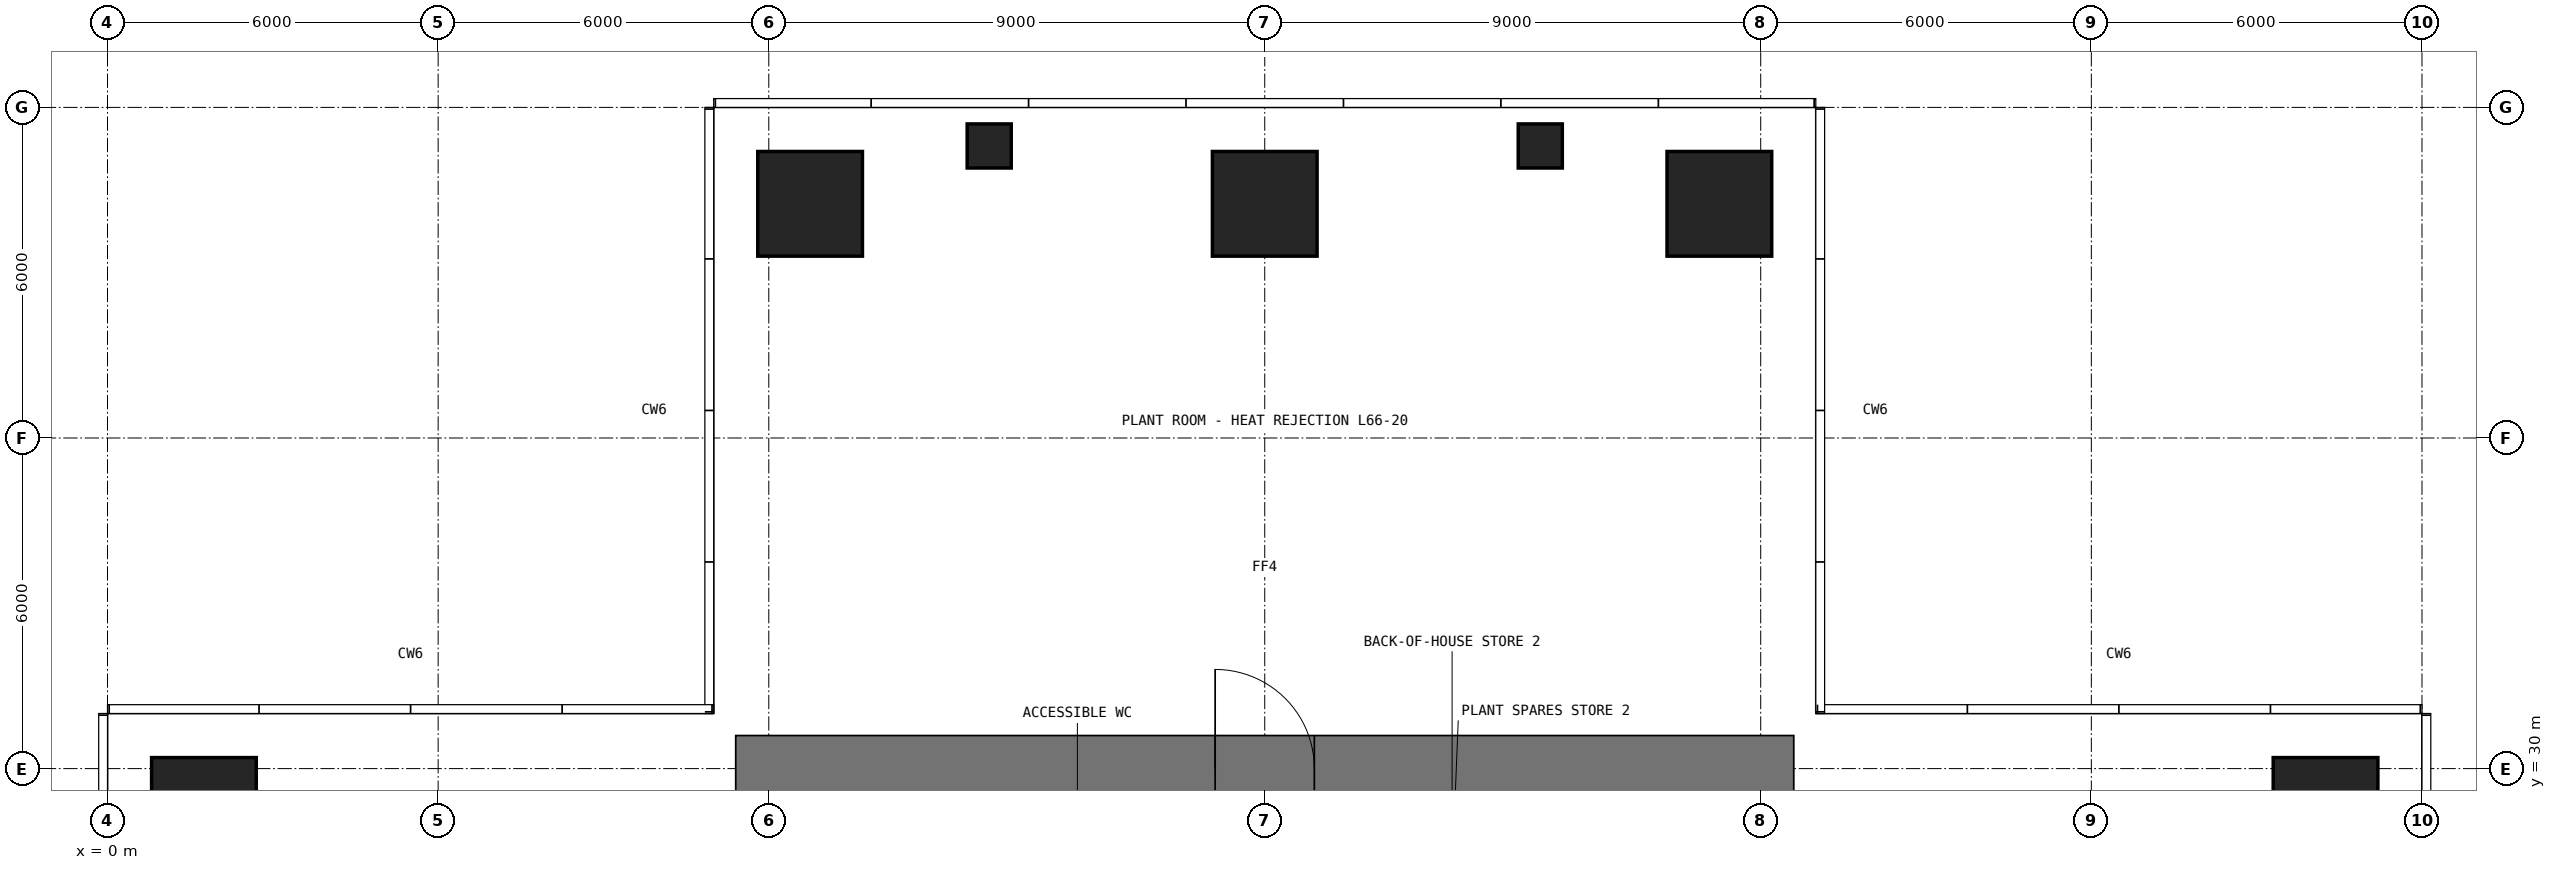
"""IFC4 building model, lengths in metres.
Left out: names, types, materials, properties, quantities, classifications, styles, units other than length and angle.
Written with IfcOpenShell. Run it as: python <this file> out.ifc"""

import sys

from ifc_helpers import new_model, si_unit, direction, frame, frame_2d, origin, origin_2d, place, context, subcontext, project, spatial, rectangle, extrude, element, fill, save


model = new_model("IFC4")
c1 = context("Model", 3, precision=1e-05, world=origin(), true_north=direction((0.0, 1.0)))
c2 = subcontext(c1, "Body", "Model", "MODEL_VIEW")
j1 = project(units=[si_unit("LENGTHUNIT", "METRE"), si_unit("PLANEANGLEUNIT", "RADIAN")], contexts=[c1])
p1 = place(None, origin())
s1 = spatial("IfcSite", under=j1, at=p1, CompositionType="ELEMENT")
p2 = place(p1, origin())
s2 = spatial("IfcBuilding", under=s1, at=p2, CompositionType="ELEMENT")
p3 = place(p2, frame((0.0, 0.0, 277.9)))
s3 = spatial("IfcBuildingStorey", under=s2, at=p3, CompositionType="ELEMENT", Elevation=277.9)
for number, where, z_axis, x_axis in (
    (1, (1.75, 29.25, 0.0), (0.0, 0.0, 1.0), (1.0, 0.0, 0.0)),
    (2, (40.25, 29.25, 0.0), (0.0, 0.0, 1.0), (1.0, 0.0, 0.0)),
    (3, (12.75, 40.25, 0.0), (0.0, 0.0, 1.0), (1.0, 0.0, 0.0)),
):
    element("IfcColumn", number, at=place(p3, frame(where, z_axis=z_axis, x_axis=x_axis)), inside=s3, PredefinedType="COLUMN", context=c2, shape_type="SweptSolid", body=[
        extrude(rectangle(XDim=1.9, YDim=1.9, at=origin_2d()), origin(), (0.0, 0.0, 1.0), 6.0),
    ])
p4 = place(p3, frame((16.0, 41.3, 0.0), z_axis=(0.0, 0.0, 1.0), x_axis=(1.0, 0.0, 0.0)))
e4 = element("IfcColumn", 4, at=p4, inside=s3, PredefinedType="COLUMN", context=c2, shape_type="SweptSolid", body=[
    extrude(rectangle(XDim=0.8, YDim=0.8, at=origin_2d()), origin(), (0.0, 0.0, 1.0), 6.0),
])
p5 = place(p3, frame((21.0, 40.25, 0.0), z_axis=(0.0, 0.0, 1.0), x_axis=(1.0, 0.0, 0.0)))
e5 = element("IfcColumn", 5, at=p5, inside=s3, PredefinedType="COLUMN", context=c2, shape_type="SweptSolid", body=[
    extrude(rectangle(XDim=1.9, YDim=1.9, at=origin_2d()), origin(), (0.0, 0.0, 1.0), 6.0),
])
p6 = place(p3, frame((26.0, 41.3, 0.0), z_axis=(0.0, 0.0, 1.0), x_axis=(1.0, 0.0, 0.0)))
e6 = element("IfcColumn", 6, at=p6, inside=s3, PredefinedType="COLUMN", context=c2, shape_type="SweptSolid", body=[
    extrude(rectangle(XDim=0.8, YDim=0.8, at=origin_2d()), origin(), (0.0, 0.0, 1.0), 6.0),
])
p7 = place(p3, frame((29.25, 40.25, 0.0), z_axis=(0.0, 0.0, 1.0), x_axis=(1.0, 0.0, 0.0)))
e7 = element("IfcColumn", 7, at=p7, inside=s3, PredefinedType="COLUMN", context=c2, shape_type="SweptSolid", body=[
    extrude(rectangle(XDim=1.9, YDim=1.9, at=origin_2d()), origin(), (0.0, 0.0, 1.0), 6.0),
])
p8 = place(p3, frame((11.4, 30.0, -0.1), z_axis=(0.0, 0.0, 1.0), x_axis=(1.0, 0.0, 0.0)))
e8 = element("IfcWall", 8, at=p8, inside=s3, PredefinedType="SHEAR", context=c2, shape_type="SweptSolid", body=[
    extrude(rectangle(XDim=19.2, YDim=1.2, at=frame_2d((9.6, 0.0))), origin(), (0.0, 0.0, 1.0), 6.0),
])
p9 = place(p8, frame((8.7, 0.0, 0.1)))
e9 = element("IfcOpeningElement", 9, at=p9, cuts=e8, PredefinedType="OPENING", context=c2, shape_type="SweptSolid", body=[
    extrude(rectangle(XDim=1.8, YDim=2.4, at=frame_2d((0.9, 1.2))), frame((0.0, 0.61, 0.0), z_axis=(0.0, -1.0, 0.0), x_axis=(1.0, 0.0, 0.0)), (0.0, 0.0, 1.0), 1.22),
])
p10 = place(p9, origin())
e10 = element("IfcDoor", 10, at=p10, inside=s3, OperationType="DOUBLE_DOOR_SINGLE_SWING", PredefinedType="DOOR", context=c2, shape_type="SweptSolid", body=[
    extrude(rectangle(XDim=1.8, YDim=2.4, at=frame_2d((0.9, 1.2))), frame((0.0, 0.325, 0.0), z_axis=(0.0, -1.0, 0.0), x_axis=(1.0, 0.0, 0.0)), (0.0, 0.0, 1.0), 0.05),
])
fill(e9, e10)
save(model, sys.argv[1])
